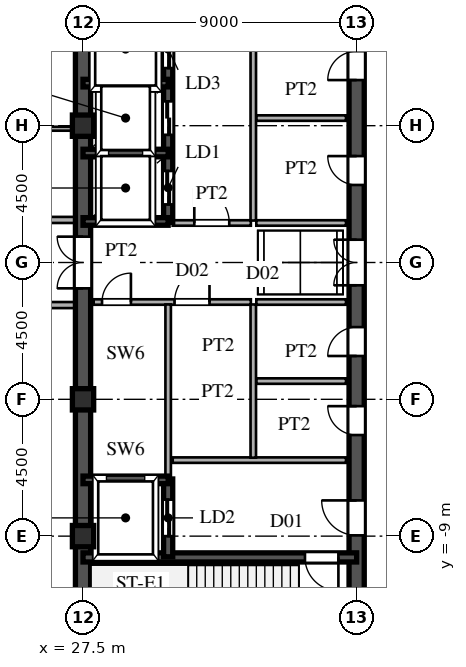
"""IFC4 building model, lengths in metres.
Left out: names, types, materials, properties, quantities, classifications, styles, units other than length and angle.
Written with IfcOpenShell. Run it as: python <this file> out.ifc"""

import sys

from ifc_helpers import new_model, si_unit, direction, frame, frame_2d, origin, origin_2d, place, context, subcontext, project, spatial, rectangle, hollow_rectangle, extrude, source, transform, mapped, element, fill, save


model = new_model("IFC4")
c1 = context("Model", 3, precision=1e-05, world=origin(), true_north=direction((0.0, 1.0)))
c2 = subcontext(c1, "Body", "Model", "MODEL_VIEW")
j1 = project(units=[si_unit("LENGTHUNIT", "METRE"), si_unit("PLANEANGLEUNIT", "RADIAN")], contexts=[c1])
p1 = place(None, origin())
s1 = spatial("IfcSite", under=j1, at=p1, CompositionType="ELEMENT")
p2 = place(p1, origin())
s2 = spatial("IfcBuilding", under=s1, at=p2, CompositionType="ELEMENT")
p3 = place(p2, frame((0.0, 0.0, 274.2)))
s3 = spatial("IfcBuildingStorey", under=s2, at=p3, CompositionType="ELEMENT", Elevation=274.2)
m1 = source(origin(), c2, "Body", "SweptSolid", [
    extrude(hollow_rectangle(XDim=0.7, YDim=0.7, WallThickness=0.03, at=origin_2d()), origin(), (0.0, 0.0, 1.0), 4.8),
])
for number, where, z_axis, x_axis in (
    (1, (27.5, -9.0, 0.0), (0.0, 0.0, 1.0), (1.0, 0.0, 0.0)),
    (2, (27.5, -4.5, 0.0), (0.0, 0.0, 1.0), (1.0, 0.0, 0.0)),
    (3, (27.5, 4.5, 0.0), (0.0, 0.0, 1.0), (1.0, 0.0, 0.0)),
):
    element("IfcColumn", number, at=place(p3, frame(where, z_axis=z_axis, x_axis=x_axis)), inside=s3, PredefinedType="COLUMN", context=c2, shape_type="MappedRepresentation", body=[
        mapped(m1, transform((0.0, 0.0, 0.0), scale=1.0)),
    ])
for number, where, z_axis, x_axis in (
    (4, (27.5, -13.5, 0.0), (0.0, 0.0, 1.0), (0.0, 1.0, 0.0)),
    (5, (27.5, 1.3, 0.0), (0.0, 0.0, 1.0), (0.0, 1.0, 0.0)),
):
    element("IfcWall", number, at=place(p3, frame(where, z_axis=z_axis, x_axis=x_axis)), inside=s3, PredefinedType="SHEAR", context=c2, shape_type="SweptSolid", body=[
        extrude(rectangle(XDim=12.2, YDim=0.5, at=frame_2d((6.1, 0.0))), origin(), (0.0, 0.0, 1.0), 4.52),
    ])
p4 = place(p3, frame((27.5, -1.3, 0.0), z_axis=(0.0, 0.0, 1.0), x_axis=(0.0, 1.0, 0.0)))
e6 = element("IfcWall", 6, at=p4, inside=s3, PredefinedType="SHEAR", context=c2, shape_type="SweptSolid", body=[
    extrude(rectangle(XDim=2.6, YDim=0.5, at=frame_2d((1.3, 0.0))), origin(), (0.0, 0.0, 1.0), 4.52),
])
p5 = place(p4, frame((0.45, 0.0, 0.0)))
e7 = element("IfcOpeningElement", 7, at=p5, cuts=e6, PredefinedType="OPENING", context=c2, shape_type="SweptSolid", body=[
    extrude(rectangle(XDim=1.7, YDim=2.35, at=frame_2d((0.85, 1.175))), frame((0.0, 0.26, 0.0), z_axis=(0.0, -1.0, 0.0), x_axis=(1.0, 0.0, 0.0)), (0.0, 0.0, 1.0), 0.52),
])
p6 = place(p3, frame((36.5, -13.65, 0.0), z_axis=(0.0, 0.0, 1.0), x_axis=(0.0, 1.0, 0.0)))
e8 = element("IfcWall", 8, at=p6, inside=s3, PredefinedType="SHEAR", context=c2, shape_type="SweptSolid", body=[
    extrude(rectangle(XDim=7.15, YDim=0.5, at=frame_2d((3.575, 0.0))), origin(), (0.0, 0.0, 1.0), 4.52),
])
p7 = place(p6, frame((4.675, 0.0, 0.0)))
e9 = element("IfcOpeningElement", 9, at=p7, cuts=e8, PredefinedType="OPENING", context=c2, shape_type="SweptSolid", body=[
    extrude(rectangle(XDim=1.15, YDim=2.2, at=frame_2d((0.575, 1.1))), frame((0.0, 0.26, 0.0), z_axis=(0.0, -1.0, 0.0), x_axis=(1.0, 0.0, 0.0)), (0.0, 0.0, 1.0), 0.52),
])
p8 = place(p3, frame((36.5, -1.3, 0.0), z_axis=(0.0, 0.0, 1.0), x_axis=(0.0, 1.0, 0.0)))
e10 = element("IfcWall", 10, at=p8, inside=s3, PredefinedType="SHEAR", context=c2, shape_type="SweptSolid", body=[
    extrude(rectangle(XDim=2.6, YDim=0.5, at=frame_2d((1.3, 0.0))), origin(), (0.0, 0.0, 1.0), 4.52),
])
p9 = place(p8, frame((0.55, 0.0, 0.0)))
e11 = element("IfcOpeningElement", 11, at=p9, cuts=e10, PredefinedType="OPENING", context=c2, shape_type="SweptSolid", body=[
    extrude(rectangle(XDim=1.5, YDim=2.3, at=frame_2d((0.75, 1.15))), frame((0.0, 0.26, 0.0), z_axis=(0.0, -1.0, 0.0), x_axis=(1.0, 0.0, 0.0)), (0.0, 0.0, 1.0), 0.52),
])
p10 = place(p3, frame((36.5, -6.5, 0.0), z_axis=(0.0, 0.0, 1.0), x_axis=(0.0, 1.0, 0.0)))
e12 = element("IfcWall", 12, at=p10, inside=s3, PredefinedType="SHEAR", context=c2, shape_type="SweptSolid", body=[
    extrude(rectangle(XDim=2.6, YDim=0.5, at=frame_2d((1.3, 0.0))), origin(), (0.0, 0.0, 1.0), 4.52),
])
p11 = place(p10, frame((0.825, 0.0, 0.0)))
e13 = element("IfcOpeningElement", 13, at=p11, cuts=e12, PredefinedType="OPENING", context=c2, shape_type="SweptSolid", body=[
    extrude(rectangle(XDim=0.95, YDim=2.15, at=frame_2d((0.475, 1.075))), frame((0.0, 0.26, 0.0), z_axis=(0.0, -1.0, 0.0), x_axis=(1.0, 0.0, 0.0)), (0.0, 0.0, 1.0), 0.52),
])
p12 = place(p3, frame((36.5, -3.9, 0.0), z_axis=(0.0, 0.0, 1.0), x_axis=(0.0, 1.0, 0.0)))
e14 = element("IfcWall", 14, at=p12, inside=s3, PredefinedType="SHEAR", context=c2, shape_type="SweptSolid", body=[
    extrude(rectangle(XDim=2.6, YDim=0.5, at=frame_2d((1.3, 0.0))), origin(), (0.0, 0.0, 1.0), 4.52),
])
p13 = place(p12, frame((0.825, 0.0, 0.0)))
e15 = element("IfcOpeningElement", 15, at=p13, cuts=e14, PredefinedType="OPENING", context=c2, shape_type="SweptSolid", body=[
    extrude(rectangle(XDim=0.95, YDim=2.15, at=frame_2d((0.475, 1.075))), frame((0.0, 0.26, 0.0), z_axis=(0.0, -1.0, 0.0), x_axis=(1.0, 0.0, 0.0)), (0.0, 0.0, 1.0), 0.52),
])
p14 = place(p3, frame((36.5, 1.3, 0.0), z_axis=(0.0, 0.0, 1.0), x_axis=(0.0, 1.0, 0.0)))
e16 = element("IfcWall", 16, at=p14, inside=s3, PredefinedType="SHEAR", context=c2, shape_type="SweptSolid", body=[
    extrude(rectangle(XDim=3.45, YDim=0.5, at=frame_2d((1.725, 0.0))), origin(), (0.0, 0.0, 1.0), 4.52),
])
p15 = place(p14, frame((1.25, 0.0, 0.0)))
e17 = element("IfcOpeningElement", 17, at=p15, cuts=e16, PredefinedType="OPENING", context=c2, shape_type="SweptSolid", body=[
    extrude(rectangle(XDim=0.95, YDim=2.15, at=frame_2d((0.475, 1.075))), frame((0.0, 0.26, 0.0), z_axis=(0.0, -1.0, 0.0), x_axis=(1.0, 0.0, 0.0)), (0.0, 0.0, 1.0), 0.52),
])
p16 = place(p3, frame((36.5, 4.75, 0.0), z_axis=(0.0, 0.0, 1.0), x_axis=(0.0, 1.0, 0.0)))
e18 = element("IfcWall", 18, at=p16, inside=s3, PredefinedType="SHEAR", context=c2, shape_type="SweptSolid", body=[
    extrude(rectangle(XDim=3.45, YDim=0.5, at=frame_2d((1.725, 0.0))), origin(), (0.0, 0.0, 1.0), 4.52),
])
p17 = place(p16, frame((1.25, 0.0, 0.0)))
e19 = element("IfcOpeningElement", 19, at=p17, cuts=e18, PredefinedType="OPENING", context=c2, shape_type="SweptSolid", body=[
    extrude(rectangle(XDim=0.95, YDim=2.15, at=frame_2d((0.475, 1.075))), frame((0.0, 0.26, 0.0), z_axis=(0.0, -1.0, 0.0), x_axis=(1.0, 0.0, 0.0)), (0.0, 0.0, 1.0), 0.52),
])
p18 = place(p3, frame((27.5, -9.7, 0.0), z_axis=(0.0, 0.0, 1.0), x_axis=(1.0, 0.0, 0.0)))
e20 = element("IfcWall", 20, at=p18, inside=s3, PredefinedType="SHEAR", context=c2, shape_type="SweptSolid", body=[
    extrude(rectangle(XDim=9.0, YDim=0.3, at=frame_2d((4.5, 0.0))), origin(), (0.0, 0.0, 1.0), 4.52),
])
p19 = place(p18, frame((7.3, 0.0, 0.0)))
e21 = element("IfcOpeningElement", 21, at=p19, cuts=e20, PredefinedType="OPENING", context=c2, shape_type="SweptSolid", body=[
    extrude(rectangle(XDim=1.1, YDim=2.2, at=frame_2d((0.55, 1.1))), frame((0.0, 0.16, 0.0), z_axis=(0.0, -1.0, 0.0), x_axis=(1.0, 0.0, 0.0)), (0.0, 0.0, 1.0), 0.32),
])
for number, where, z_axis, x_axis in (
    (22, (27.5, -7.15, 0.0), (0.0, 0.0, 1.0), (1.0, 0.0, 0.0)),
    (23, (27.5, 1.35, 0.0), (0.0, 0.0, 1.0), (1.0, 0.0, 0.0)),
    (24, (27.5, 3.6, 0.0), (0.0, 0.0, 1.0), (1.0, 0.0, 0.0)),
    (25, (27.5, 5.9, 0.0), (0.0, 0.0, 1.0), (1.0, 0.0, 0.0)),
):
    element("IfcWall", number, at=place(p3, frame(where, z_axis=z_axis, x_axis=x_axis)), inside=s3, PredefinedType="SHEAR", context=c2, shape_type="SweptSolid", body=[
        extrude(rectangle(XDim=2.8, YDim=0.25, at=frame_2d((1.4, 0.0))), origin(), (0.0, 0.0, 1.0), 4.52),
    ])
p20 = place(p3, frame((30.3, -9.68, 0.0), z_axis=(0.0, 0.0, 1.0), x_axis=(0.0, 1.0, 0.0)))
e26 = element("IfcWall", 26, at=p20, inside=s3, PredefinedType="SHEAR", context=c2, shape_type="SweptSolid", body=[
    extrude(rectangle(XDim=2.56, YDim=0.3, at=frame_2d((1.28, 0.0))), origin(), (0.0, 0.0, 1.0), 4.52),
])
p21 = place(p20, frame((0.68, 0.0, 0.0)))
e27 = element("IfcOpeningElement", 27, at=p21, cuts=e26, PredefinedType="OPENING", context=c2, shape_type="SweptSolid", body=[
    extrude(rectangle(XDim=1.2, YDim=2.25, at=frame_2d((0.6, 1.125))), frame((0.0, 0.16, 0.0), z_axis=(0.0, -1.0, 0.0), x_axis=(1.0, 0.0, 0.0)), (0.0, 0.0, 1.0), 0.32),
])
p22 = place(p3, frame((30.3, 1.32, 0.0), z_axis=(0.0, 0.0, 1.0), x_axis=(0.0, 1.0, 0.0)))
e28 = element("IfcWall", 28, at=p22, inside=s3, PredefinedType="SHEAR", context=c2, shape_type="SweptSolid", body=[
    extrude(rectangle(XDim=2.28, YDim=0.3, at=frame_2d((1.14, 0.0))), origin(), (0.0, 0.0, 1.0), 4.52),
])
p23 = place(p22, frame((0.59, 0.0, 0.0)))
e29 = element("IfcOpeningElement", 29, at=p23, cuts=e28, PredefinedType="OPENING", context=c2, shape_type="SweptSolid", body=[
    extrude(rectangle(XDim=1.1, YDim=2.2, at=frame_2d((0.55, 1.1))), frame((0.0, 0.16, 0.0), z_axis=(0.0, -1.0, 0.0), x_axis=(1.0, 0.0, 0.0)), (0.0, 0.0, 1.0), 0.32),
])
p24 = place(p3, frame((30.3, 3.6, 0.0), z_axis=(0.0, 0.0, 1.0), x_axis=(0.0, 1.0, 0.0)))
e30 = element("IfcWall", 30, at=p24, inside=s3, PredefinedType="SHEAR", context=c2, shape_type="SweptSolid", body=[
    extrude(rectangle(XDim=2.3, YDim=0.3, at=frame_2d((1.15, 0.0))), origin(), (0.0, 0.0, 1.0), 4.52),
])
p25 = place(p24, frame((0.6, 0.0, 0.0)))
e31 = element("IfcOpeningElement", 31, at=p25, cuts=e30, PredefinedType="OPENING", context=c2, shape_type="SweptSolid", body=[
    extrude(rectangle(XDim=1.1, YDim=2.2, at=frame_2d((0.55, 1.1))), frame((0.0, 0.16, 0.0), z_axis=(0.0, -1.0, 0.0), x_axis=(1.0, 0.0, 0.0)), (0.0, 0.0, 1.0), 0.32),
])
p26 = place(p3, frame((30.3, 5.9, 0.0), z_axis=(0.0, 0.0, 1.0), x_axis=(0.0, 1.0, 0.0)))
e32 = element("IfcWall", 32, at=p26, inside=s3, PredefinedType="SHEAR", context=c2, shape_type="SweptSolid", body=[
    extrude(rectangle(XDim=2.25, YDim=0.3, at=frame_2d((1.125, 0.0))), origin(), (0.0, 0.0, 1.0), 4.52),
])
p27 = place(p26, frame((0.495, 0.0, 0.0)))
e33 = element("IfcOpeningElement", 33, at=p27, cuts=e32, PredefinedType="OPENING", context=c2, shape_type="SweptSolid", body=[
    extrude(rectangle(XDim=1.25, YDim=2.3, at=frame_2d((0.625, 1.15))), frame((0.0, 0.16, 0.0), z_axis=(0.0, -1.0, 0.0), x_axis=(1.0, 0.0, 0.0)), (0.0, 0.0, 1.0), 0.32),
])
p28 = place(p3, frame((30.45, -6.5, 0.0), z_axis=(0.0, 0.0, 1.0), x_axis=(1.0, 0.0, 0.0)))
e34 = element("IfcWall", 34, at=p28, inside=s3, PredefinedType="PARTITIONING", context=c2, shape_type="SweptSolid", body=[
    extrude(rectangle(XDim=5.7, YDim=0.18, at=frame_2d((2.85, 0.0))), origin(), (0.0, 0.0, 1.0), 4.52),
])
p29 = place(p3, frame((33.1, -6.42, 0.0), z_axis=(0.0, 0.0, 1.0), x_axis=(0.0, 1.0, 0.0)))
e35 = element("IfcWall", 35, at=p29, inside=s3, PredefinedType="PARTITIONING", context=c2, shape_type="SweptSolid", body=[
    extrude(rectangle(XDim=5.04, YDim=0.18, at=frame_2d((2.52, 0.0))), origin(), (0.0, 0.0, 1.0), 4.52),
])
p30 = place(p3, frame((33.1, 1.38, 0.0), z_axis=(0.0, 0.0, 1.0), x_axis=(0.0, 1.0, 0.0)))
e36 = element("IfcWall", 36, at=p30, inside=s3, PredefinedType="PARTITIONING", context=c2, shape_type="SweptSolid", body=[
    extrude(rectangle(XDim=6.74, YDim=0.18, at=frame_2d((3.37, 0.0))), origin(), (0.0, 0.0, 1.0), 4.52),
])
p31 = place(p3, frame((27.85, -1.3, 0.0), z_axis=(0.0, 0.0, 1.0), x_axis=(1.0, 0.0, 0.0)))
e37 = element("IfcWall", 37, at=p31, inside=s3, PredefinedType="PARTITIONING", context=c2, shape_type="SweptSolid", body=[
    extrude(rectangle(XDim=2.45, YDim=0.18, at=frame_2d((1.225, 0.0))), origin(), (0.0, 0.0, 1.0), 4.52),
])
p32 = place(p31, frame((0.275, 0.0, 0.0)))
e38 = element("IfcOpeningElement", 38, at=p32, cuts=e37, PredefinedType="OPENING", context=c2, shape_type="SweptSolid", body=[
    extrude(rectangle(XDim=0.95, YDim=2.15, at=frame_2d((0.475, 1.075))), frame((0.0, 0.1, 0.0), z_axis=(0.0, -1.0, 0.0), x_axis=(1.0, 0.0, 0.0)), (0.0, 0.0, 1.0), 0.2),
])
p33 = place(p3, frame((30.3, -1.3, 0.0), z_axis=(0.0, 0.0, 1.0), x_axis=(1.0, 0.0, 0.0)))
e39 = element("IfcWall", 39, at=p33, inside=s3, PredefinedType="PARTITIONING", context=c2, shape_type="SweptSolid", body=[
    extrude(rectangle(XDim=2.72, YDim=0.18, at=frame_2d((1.36, 0.0))), origin(), (0.0, 0.0, 1.0), 4.52),
])
p34 = place(p33, frame((0.21, 0.0, 0.0)))
e40 = element("IfcOpeningElement", 40, at=p34, cuts=e39, PredefinedType="OPENING", context=c2, shape_type="SweptSolid", body=[
    extrude(rectangle(XDim=1.15, YDim=2.2, at=frame_2d((0.575, 1.1))), frame((0.0, 0.1, 0.0), z_axis=(0.0, -1.0, 0.0), x_axis=(1.0, 0.0, 0.0)), (0.0, 0.0, 1.0), 0.2),
])
p35 = place(p3, frame((30.3, -7.12, 0.0), z_axis=(0.0, 0.0, 1.0), x_axis=(0.0, 1.0, 0.0)))
e41 = element("IfcWall", 41, at=p35, inside=s3, PredefinedType="PARTITIONING", context=c2, shape_type="SweptSolid", body=[
    extrude(rectangle(XDim=5.74, YDim=0.18, at=frame_2d((2.87, 0.0))), origin(), (0.0, 0.0, 1.0), 4.52),
])
p36 = place(p3, frame((30.45, 1.3, 0.0), z_axis=(0.0, 0.0, 1.0), x_axis=(1.0, 0.0, 0.0)))
e42 = element("IfcWall", 42, at=p36, inside=s3, PredefinedType="PARTITIONING", context=c2, shape_type="SweptSolid", body=[
    extrude(rectangle(XDim=2.57, YDim=0.18, at=frame_2d((1.285, 0.0))), origin(), (0.0, 0.0, 1.0), 4.52),
])
p37 = place(p36, frame((0.71, 0.0, 0.0)))
e43 = element("IfcOpeningElement", 43, at=p37, cuts=e42, PredefinedType="OPENING", context=c2, shape_type="SweptSolid", body=[
    extrude(rectangle(XDim=1.15, YDim=2.2, at=frame_2d((0.575, 1.1))), frame((0.0, 0.1, 0.0), z_axis=(0.0, -1.0, 0.0), x_axis=(1.0, 0.0, 0.0)), (0.0, 0.0, 1.0), 0.2),
])
for number, where, z_axis, x_axis in (
    (44, (33.2, -1.3, 0.0), (0.0, 0.0, 1.0), (1.0, 0.0, 0.0)),
    (45, (33.2, 1.3, 0.0), (0.0, 0.0, 1.0), (1.0, 0.0, 0.0)),
    (46, (33.2, -3.9, 0.0), (0.0, 0.0, 1.0), (1.0, 0.0, 0.0)),
    (47, (33.2, 4.75, 0.0), (0.0, 0.0, 1.0), (1.0, 0.0, 0.0)),
):
    element("IfcWall", number, at=place(p3, frame(where, z_axis=z_axis, x_axis=x_axis)), inside=s3, PredefinedType="PARTITIONING", context=c2, shape_type="SweptSolid", body=[
        extrude(rectangle(XDim=2.95, YDim=0.18, at=frame_2d((1.475, 0.0))), origin(), (0.0, 0.0, 1.0), 4.52),
    ])
p38 = place(p3, frame((-27.245, -1.4, 0.0), z_axis=(0.0, 0.0, 1.0), x_axis=(1.0, 0.0, 0.0)))
e48 = element("IfcWall", 48, at=p38, inside=s3, PredefinedType="PARTITIONING", context=c2, shape_type="SweptSolid", body=[
    extrude(rectangle(XDim=54.49, YDim=0.2, at=frame_2d((27.245, 0.0))), origin(), (0.0, 0.0, 1.0), 4.52),
])
p39 = place(p38, frame((17.67, 0.0, 0.0)))
e49 = element("IfcOpeningElement", 49, at=p39, cuts=e48, PredefinedType="OPENING", context=c2, shape_type="SweptSolid", body=[
    extrude(rectangle(XDim=1.15, YDim=2.2, at=frame_2d((0.575, 1.1))), frame((0.0, 0.11, 0.0), z_axis=(0.0, -1.0, 0.0), x_axis=(1.0, 0.0, 0.0)), (0.0, 0.0, 1.0), 0.22),
])
p40 = place(p38, frame((35.17, 0.0, 0.0)))
e50 = element("IfcOpeningElement", 50, at=p40, cuts=e48, PredefinedType="OPENING", context=c2, shape_type="SweptSolid", body=[
    extrude(rectangle(XDim=1.15, YDim=2.2, at=frame_2d((0.575, 1.1))), frame((0.0, 0.11, 0.0), z_axis=(0.0, -1.0, 0.0), x_axis=(1.0, 0.0, 0.0)), (0.0, 0.0, 1.0), 0.22),
])
p41 = place(p3, frame((-27.245, 1.4, 0.0), z_axis=(0.0, 0.0, 1.0), x_axis=(1.0, 0.0, 0.0)))
e51 = element("IfcWall", 51, at=p41, inside=s3, PredefinedType="PARTITIONING", context=c2, shape_type="SweptSolid", body=[
    extrude(rectangle(XDim=54.49, YDim=0.2, at=frame_2d((27.245, 0.0))), origin(), (0.0, 0.0, 1.0), 4.52),
])
p42 = place(p41, frame((17.67, 0.0, 0.0)))
e52 = element("IfcOpeningElement", 52, at=p42, cuts=e51, PredefinedType="OPENING", context=c2, shape_type="SweptSolid", body=[
    extrude(rectangle(XDim=1.15, YDim=2.2, at=frame_2d((0.575, 1.1))), frame((0.0, 0.11, 0.0), z_axis=(0.0, -1.0, 0.0), x_axis=(1.0, 0.0, 0.0)), (0.0, 0.0, 1.0), 0.22),
])
p43 = place(p41, frame((41.805, 0.0, 0.0)))
e53 = element("IfcOpeningElement", 53, at=p43, cuts=e51, PredefinedType="OPENING", context=c2, shape_type="SweptSolid", body=[
    extrude(rectangle(XDim=0.88, YDim=2.1, at=frame_2d((0.44, 1.05))), frame((0.0, 0.11, 0.0), z_axis=(0.0, -1.0, 0.0), x_axis=(1.0, 0.0, 0.0)), (0.0, 0.0, 1.0), 0.22),
])
p44 = place(p41, frame((49.905, 0.0, 0.0)))
e54 = element("IfcOpeningElement", 54, at=p44, cuts=e51, PredefinedType="OPENING", context=c2, shape_type="SweptSolid", body=[
    extrude(rectangle(XDim=0.88, YDim=2.1, at=frame_2d((0.44, 1.05))), frame((0.0, 0.11, 0.0), z_axis=(0.0, -1.0, 0.0), x_axis=(1.0, 0.0, 0.0)), (0.0, 0.0, 1.0), 0.22),
])
p45 = place(p3, frame((11.085, 4.4, 0.0), z_axis=(0.0, 0.0, 1.0), x_axis=(1.0, 0.0, 0.0)))
e55 = element("IfcWall", 55, at=p45, inside=s3, PredefinedType="PARTITIONING", context=c2, shape_type="SweptSolid", body=[
    extrude(rectangle(XDim=16.16, YDim=0.13, at=frame_2d((8.08, 0.0))), origin(), (0.0, 0.0, 1.0), 4.52),
])
m2 = source(origin(), c2, "Body", "SweptSolid", [
    extrude(rectangle(XDim=1.7, YDim=2.35, at=frame_2d((0.85, 1.175))), frame((0.0, 0.025, 0.0), z_axis=(0.0, -1.0, 0.0), x_axis=(1.0, 0.0, 0.0)), (0.0, 0.0, 1.0), 0.05),
])
p46 = place(p5, origin())
e56 = element("IfcDoor", 56, at=p46, inside=s3, OperationType="DOUBLE_SWING_LEFT", PredefinedType="DOOR", context=c2, shape_type="MappedRepresentation", body=[
    mapped(m2, transform((0.0, 0.0, 0.0), scale=1.0)),
])
fill(e7, e56)
m3 = source(origin(), c2, "Body", "SweptSolid", [
    extrude(rectangle(XDim=1.15, YDim=2.2, at=frame_2d((0.575, 1.1))), frame((0.0, 0.025, 0.0), z_axis=(0.0, -1.0, 0.0), x_axis=(1.0, 0.0, 0.0)), (0.0, 0.0, 1.0), 0.05),
])
p47 = place(p7, origin())
e57 = element("IfcDoor", 57, at=p47, inside=s3, OperationType="SINGLE_SWING_RIGHT", PredefinedType="DOOR", context=c2, shape_type="MappedRepresentation", body=[
    mapped(m3, transform((0.0, 0.0, 0.0), scale=1.0)),
])
fill(e9, e57)
m4 = source(origin(), c2, "Body", "SweptSolid", [
    extrude(rectangle(XDim=1.5, YDim=2.3, at=frame_2d((0.75, 1.15))), frame((0.0, 0.025, 0.0), z_axis=(0.0, -1.0, 0.0), x_axis=(1.0, 0.0, 0.0)), (0.0, 0.0, 1.0), 0.05),
])
p48 = place(p9, origin())
e58 = element("IfcDoor", 58, at=p48, inside=s3, OperationType="DOUBLE_SWING_LEFT", PredefinedType="DOOR", context=c2, shape_type="MappedRepresentation", body=[
    mapped(m4, transform((0.0, 0.0, 0.0), scale=1.0)),
])
fill(e11, e58)
m5 = source(origin(), c2, "Body", "SweptSolid", [
    extrude(rectangle(XDim=0.95, YDim=2.15, at=frame_2d((0.475, 1.075))), frame((0.0, 0.025, 0.0), z_axis=(0.0, -1.0, 0.0), x_axis=(1.0, 0.0, 0.0)), (0.0, 0.0, 1.0), 0.05),
])
p49 = place(p11, origin())
e59 = element("IfcDoor", 59, at=p49, inside=s3, OperationType="SINGLE_SWING_RIGHT", PredefinedType="DOOR", context=c2, shape_type="MappedRepresentation", body=[
    mapped(m5, transform((0.0, 0.0, 0.0), scale=1.0)),
])
fill(e13, e59)
p50 = place(p13, origin())
e60 = element("IfcDoor", 60, at=p50, inside=s3, OperationType="SINGLE_SWING_LEFT", PredefinedType="DOOR", context=c2, shape_type="MappedRepresentation", body=[
    mapped(m5, transform((0.0, 0.0, 0.0), scale=1.0)),
])
fill(e15, e60)
p51 = place(p15, origin())
e61 = element("IfcDoor", 61, at=p51, inside=s3, OperationType="SINGLE_SWING_RIGHT", PredefinedType="DOOR", context=c2, shape_type="MappedRepresentation", body=[
    mapped(m5, transform((0.0, 0.0, 0.0), scale=1.0)),
])
fill(e17, e61)
p52 = place(p17, origin())
e62 = element("IfcDoor", 62, at=p52, inside=s3, OperationType="SINGLE_SWING_LEFT", PredefinedType="DOOR", context=c2, shape_type="MappedRepresentation", body=[
    mapped(m5, transform((0.0, 0.0, 0.0), scale=1.0)),
])
fill(e19, e62)
m6 = source(origin(), c2, "Body", "SweptSolid", [
    extrude(rectangle(XDim=1.1, YDim=2.2, at=frame_2d((0.55, 1.1))), frame((0.0, 0.025, 0.0), z_axis=(0.0, -1.0, 0.0), x_axis=(1.0, 0.0, 0.0)), (0.0, 0.0, 1.0), 0.05),
])
p53 = place(p19, frame((1.1, 0.0, 0.0), z_axis=(0.0, 0.0, 1.0), x_axis=(-1.0, 0.0, 0.0)))
e63 = element("IfcDoor", 63, at=p53, inside=s3, OperationType="SINGLE_SWING_RIGHT", PredefinedType="DOOR", context=c2, shape_type="MappedRepresentation", body=[
    mapped(m6, transform((0.0, 0.0, 0.0), scale=1.0)),
])
fill(e21, e63)
m7 = source(origin(), c2, "Body", "SweptSolid", [
    extrude(rectangle(XDim=1.2, YDim=2.25, at=frame_2d((0.6, 1.125))), frame((0.0, 0.025, 0.0), z_axis=(0.0, -1.0, 0.0), x_axis=(1.0, 0.0, 0.0)), (0.0, 0.0, 1.0), 0.05),
])
p54 = place(p21, origin())
e64 = element("IfcDoor", 64, at=p54, inside=s3, OperationType="DOUBLE_DOOR_SLIDING", PredefinedType="DOOR", context=c2, shape_type="MappedRepresentation", body=[
    mapped(m7, transform((0.0, 0.0, 0.0), scale=1.0)),
])
fill(e27, e64)
m8 = source(origin(), c2, "Body", "SweptSolid", [
    extrude(rectangle(XDim=1.1, YDim=2.2, at=frame_2d((0.55, 1.1))), frame((0.0, 0.025, 0.0), z_axis=(0.0, -1.0, 0.0), x_axis=(1.0, 0.0, 0.0)), (0.0, 0.0, 1.0), 0.05),
])
p55 = place(p23, origin())
e65 = element("IfcDoor", 65, at=p55, inside=s3, OperationType="DOUBLE_DOOR_SLIDING", PredefinedType="DOOR", context=c2, shape_type="MappedRepresentation", body=[
    mapped(m8, transform((0.0, 0.0, 0.0), scale=1.0)),
])
fill(e29, e65)
p56 = place(p25, origin())
e66 = element("IfcDoor", 66, at=p56, inside=s3, OperationType="DOUBLE_DOOR_SLIDING", PredefinedType="DOOR", context=c2, shape_type="MappedRepresentation", body=[
    mapped(m8, transform((0.0, 0.0, 0.0), scale=1.0)),
])
fill(e31, e66)
m9 = source(origin(), c2, "Body", "SweptSolid", [
    extrude(rectangle(XDim=1.25, YDim=2.3, at=frame_2d((0.625, 1.15))), frame((0.0, 0.025, 0.0), z_axis=(0.0, -1.0, 0.0), x_axis=(1.0, 0.0, 0.0)), (0.0, 0.0, 1.0), 0.05),
])
p57 = place(p27, origin())
e67 = element("IfcDoor", 67, at=p57, inside=s3, OperationType="DOUBLE_DOOR_SLIDING", PredefinedType="DOOR", context=c2, shape_type="MappedRepresentation", body=[
    mapped(m9, transform((0.0, 0.0, 0.0), scale=1.0)),
])
fill(e33, e67)
p58 = place(p32, origin())
e68 = element("IfcDoor", 68, at=p58, inside=s3, OperationType="SINGLE_SWING_RIGHT", PredefinedType="DOOR", context=c2, shape_type="MappedRepresentation", body=[
    mapped(m5, transform((0.0, 0.0, 0.0), scale=1.0)),
])
fill(e38, e68)
p59 = place(p34, origin())
e69 = element("IfcDoor", 69, at=p59, inside=s3, OperationType="SINGLE_SWING_RIGHT", PredefinedType="DOOR", context=c2, shape_type="MappedRepresentation", body=[
    mapped(m3, transform((0.0, 0.0, 0.0), scale=1.0)),
])
fill(e40, e69)
p60 = place(p37, origin())
e70 = element("IfcDoor", 70, at=p60, inside=s3, OperationType="SINGLE_SWING_LEFT", PredefinedType="DOOR", context=c2, shape_type="MappedRepresentation", body=[
    mapped(m3, transform((0.0, 0.0, 0.0), scale=1.0)),
])
fill(e43, e70)
save(model, sys.argv[1])
